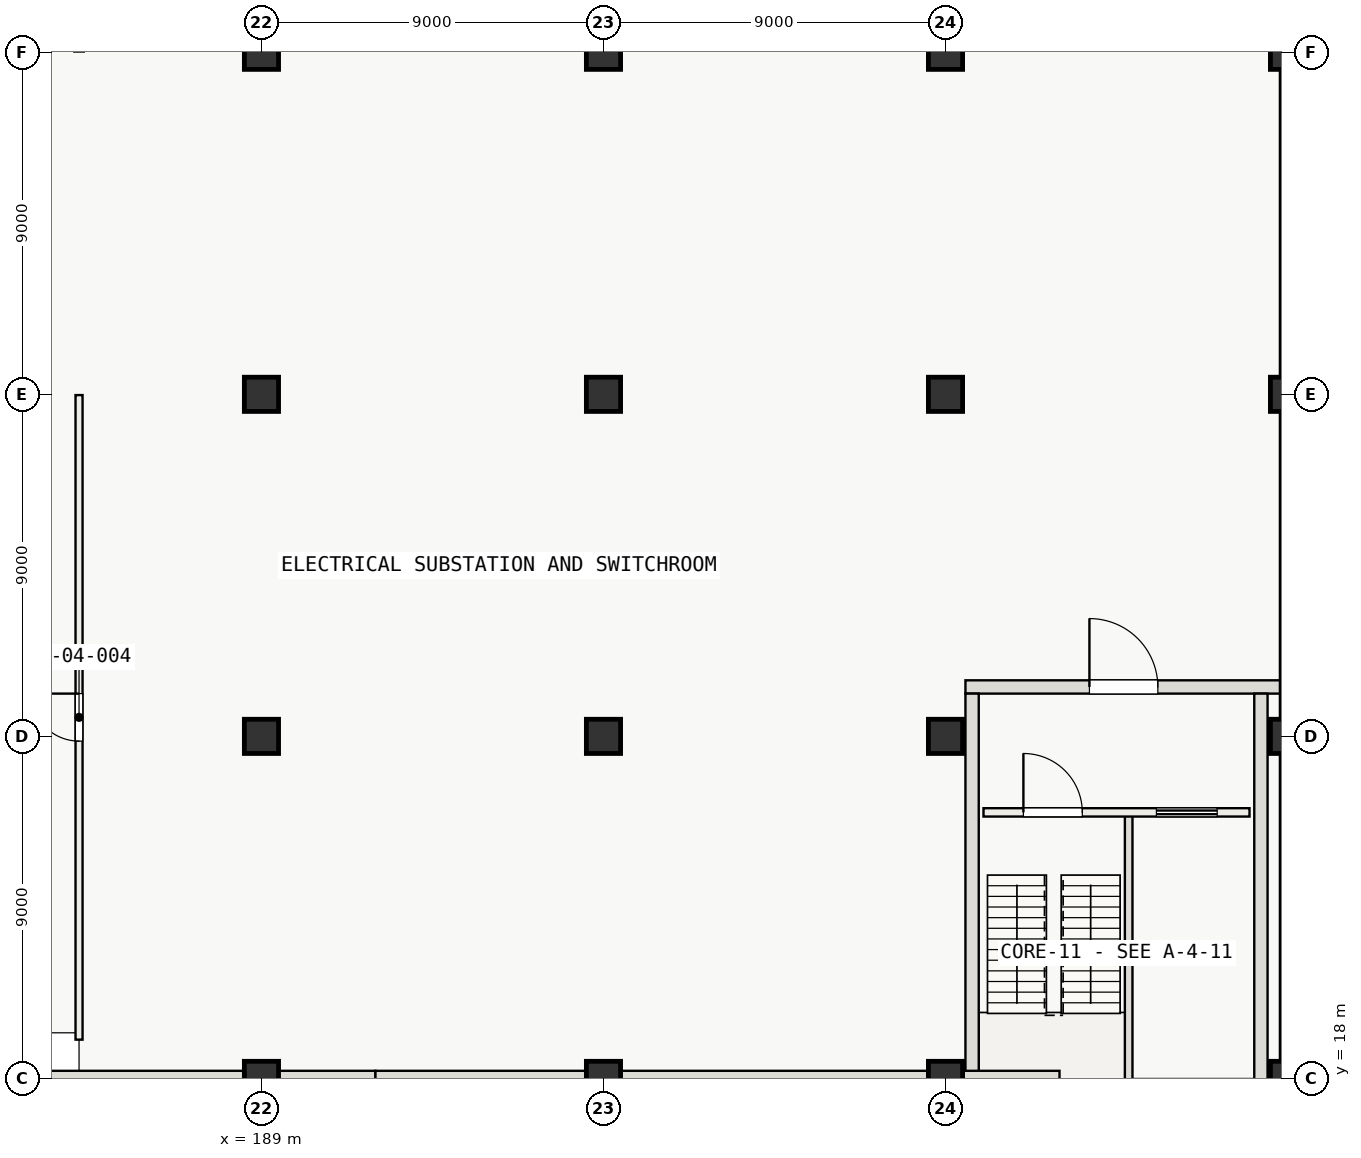
"""IFC4 building model, lengths in metres.
Left out: names, types, materials, properties, quantities, classifications, styles, units other than length and angle.
Written with IfcOpenShell. Run it as: python <this file> out.ifc"""

import sys

from ifc_helpers import new_model, si_unit, direction, frame, frame_2d, origin, origin_2d, place, context, subcontext, project, spatial, rectangle, extrude, element, fill, save


model = new_model("IFC4")
c1 = context("Model", 3, precision=1e-05, world=origin(), true_north=direction((0.0, 1.0)))
c2 = subcontext(c1, "Body", "Model", "MODEL_VIEW")
j1 = project(units=[si_unit("LENGTHUNIT", "METRE"), si_unit("PLANEANGLEUNIT", "RADIAN")], contexts=[c1])
p1 = place(None, origin())
s1 = spatial("IfcSite", under=j1, at=p1, CompositionType="ELEMENT")
p2 = place(p1, origin())
s2 = spatial("IfcBuilding", under=s1, at=p2, CompositionType="ELEMENT")
p3 = place(p2, frame((0.0, 0.0, -4.8)))
s3 = spatial("IfcBuildingStorey", under=s2, at=p3, CompositionType="ELEMENT", Elevation=-4.8)
p4 = place(p3, frame((207.525, 28.3, -0.45), z_axis=(0.0, 0.0, 1.0), x_axis=(1.0, 0.0, 0.0)))
e1 = element("IfcWall", 1, at=p4, inside=s3, PredefinedType="SHEAR", context=c2, shape_type="SweptSolid", body=[
    extrude(rectangle(XDim=8.325, YDim=0.35, at=frame_2d((4.163, 0.0))), origin(), (0.0, 0.0, 1.0), 5.25),
])
p5 = place(p4, frame((3.262, 0.0, 0.45)))
e2 = element("IfcOpeningElement", 2, at=p5, cuts=e1, PredefinedType="OPENING", context=c2, shape_type="SweptSolid", body=[
    extrude(rectangle(XDim=1.8, YDim=2.3, at=frame_2d((0.9, 1.15))), frame((0.0, 0.185, 0.0), z_axis=(0.0, -1.0, 0.0), x_axis=(1.0, 0.0, 0.0)), (0.0, 0.0, 1.0), 0.37),
])
for number, where, z_axis, x_axis in (
    (3, (207.7, 16.875, -0.45), (0.0, 0.0, 1.0), (0.0, 1.0, 0.0)),
    (4, (215.3, 16.875, -0.45), (0.0, 0.0, 1.0), (0.0, 1.0, 0.0)),
):
    element("IfcWall", number, at=place(p3, frame(where, z_axis=z_axis, x_axis=x_axis)), inside=s3, PredefinedType="SHEAR", context=c2, shape_type="SweptSolid", body=[
        extrude(rectangle(XDim=11.25, YDim=0.35, at=frame_2d((5.625, 0.0))), origin(), (0.0, 0.0, 1.0), 5.25),
    ])
for number, where, z_axis, x_axis in (
    (5, (174.0, 18.0, -0.45), (0.0, 0.0, 1.0), (1.0, 0.0, 0.0)),
    (6, (192.0, 18.0, -0.45), (0.0, 0.0, 1.0), (1.0, 0.0, 0.0)),
    (7, (216.0, 18.0, -0.45), (0.0, 0.0, 1.0), (0.0, 1.0, 0.0)),
    (8, (216.0, 36.0, -0.45), (0.0, 0.0, 1.0), (0.0, 1.0, 0.0)),
):
    element("IfcWall", number, at=place(p3, frame(where, z_axis=z_axis, x_axis=x_axis)), inside=s3, PredefinedType="USERDEFINED", context=c2, shape_type="SweptSolid", body=[
        extrude(rectangle(XDim=18.0, YDim=0.4, at=frame_2d((9.0, 0.0))), origin(), (0.0, 0.0, 1.0), 5.25),
    ])
for number, where, z_axis, x_axis in (
    (9, (189.0, 18.0, -0.45), (0.0, 0.0, 1.0), (1.0, 0.0, 0.0)),
    (10, (189.0, 27.0, -0.45), (0.0, 0.0, 1.0), (1.0, 0.0, 0.0)),
    (11, (189.0, 36.0, -0.45), (0.0, 0.0, 1.0), (1.0, 0.0, 0.0)),
    (12, (189.0, 45.0, -0.45), (0.0, 0.0, 1.0), (1.0, 0.0, 0.0)),
    (13, (198.0, 18.0, -0.45), (0.0, 0.0, 1.0), (1.0, 0.0, 0.0)),
    (14, (198.0, 27.0, -0.45), (0.0, 0.0, 1.0), (1.0, 0.0, 0.0)),
    (15, (198.0, 36.0, -0.45), (0.0, 0.0, 1.0), (1.0, 0.0, 0.0)),
    (16, (198.0, 45.0, -0.45), (0.0, 0.0, 1.0), (1.0, 0.0, 0.0)),
    (17, (207.0, 18.0, -0.45), (0.0, 0.0, 1.0), (1.0, 0.0, 0.0)),
    (18, (207.0, 27.0, -0.45), (0.0, 0.0, 1.0), (1.0, 0.0, 0.0)),
    (19, (207.0, 36.0, -0.45), (0.0, 0.0, 1.0), (1.0, 0.0, 0.0)),
    (20, (207.0, 45.0, -0.45), (0.0, 0.0, 1.0), (1.0, 0.0, 0.0)),
    (21, (216.0, 18.0, -0.45), (0.0, 0.0, 1.0), (1.0, 0.0, 0.0)),
    (22, (216.0, 27.0, -0.45), (0.0, 0.0, 1.0), (1.0, 0.0, 0.0)),
    (23, (216.0, 36.0, -0.45), (0.0, 0.0, 1.0), (1.0, 0.0, 0.0)),
    (24, (216.0, 45.0, -0.45), (0.0, 0.0, 1.0), (1.0, 0.0, 0.0)),
):
    element("IfcColumn", number, at=place(p3, frame(where, z_axis=z_axis, x_axis=x_axis)), inside=s3, PredefinedType="COLUMN", context=c2, shape_type="SweptSolid", body=[
        extrude(rectangle(XDim=0.9, YDim=0.9, at=origin_2d()), origin(), (0.0, 0.0, 1.0), 5.25),
    ])
p6 = place(p3, frame((211.82, 16.95, -0.45), z_axis=(0.0, 0.0, 1.0), x_axis=(0.0, 1.0, 0.0)))
e25 = element("IfcWall", 25, at=p6, inside=s3, PredefinedType="SOLIDWALL", context=c2, shape_type="SweptSolid", body=[
    extrude(rectangle(XDim=8.0, YDim=0.2, at=frame_2d((4.0, 0.0))), origin(), (0.0, 0.0, 1.0), 5.25),
])
p7 = place(p3, frame((208.0, 25.0, 0.0), z_axis=(0.0, 0.0, 1.0), x_axis=(1.0, 0.0, 0.0)))
e26 = element("IfcWall", 26, at=p7, inside=s3, PredefinedType="SOLIDWALL", context=c2, shape_type="SweptSolid", body=[
    extrude(rectangle(XDim=7.0, YDim=0.22, at=frame_2d((3.5, 0.0))), origin(), (0.0, 0.0, 1.0), 4.4),
])
p8 = place(p7, frame((1.05, 0.0, 0.0)))
e27 = element("IfcOpeningElement", 27, at=p8, cuts=e26, PredefinedType="OPENING", context=c2, shape_type="SweptSolid", body=[
    extrude(rectangle(XDim=1.55, YDim=2.2, at=frame_2d((0.775, 1.1))), frame((0.0, 0.12, 0.0), z_axis=(0.0, -1.0, 0.0), x_axis=(1.0, 0.0, 0.0)), (0.0, 0.0, 1.0), 0.24),
])
p9 = place(p7, frame((4.55, 0.0, 0.0)))
e28 = element("IfcOpeningElement", 28, at=p9, cuts=e26, PredefinedType="OPENING", context=c2, shape_type="SweptSolid", body=[
    extrude(rectangle(XDim=1.6, YDim=2.3, at=frame_2d((0.8, 1.15))), frame((0.0, 0.12, 0.0), z_axis=(0.0, -1.0, 0.0), x_axis=(1.0, 0.0, 0.0)), (0.0, 0.0, 1.0), 0.24),
])
p10 = place(p3, frame((184.2, 19.02, 0.0), z_axis=(0.0, 0.0, 1.0), x_axis=(0.0, 1.0, 0.0)))
e29 = element("IfcWall", 29, at=p10, inside=s3, PredefinedType="PARTITIONING", context=c2, shape_type="SweptSolid", body=[
    extrude(rectangle(XDim=16.96, YDim=0.185, at=frame_2d((8.48, 0.0))), origin(), (0.0, 0.0, 1.0), 3.42),
])
p11 = place(p10, frame((7.855, 0.0, 0.0)))
e30 = element("IfcOpeningElement", 30, at=p11, cuts=e29, PredefinedType="OPENING", context=c2, shape_type="SweptSolid", body=[
    extrude(rectangle(XDim=1.25, YDim=2.25, at=frame_2d((0.625, 1.125))), frame((0.0, 0.103, 0.0), z_axis=(0.0, -1.0, 0.0), x_axis=(1.0, 0.0, 0.0)), (0.0, 0.0, 1.0), 0.205),
])
p12 = place(p8, origin())
e31 = element("IfcDoor", 31, at=p12, inside=s3, OperationType="SINGLE_SWING_LEFT", PredefinedType="DOOR", context=c2, shape_type="SweptSolid", body=[
    extrude(rectangle(XDim=1.55, YDim=2.2, at=frame_2d((0.775, 1.1))), frame((0.0, 0.025, 0.0), z_axis=(0.0, -1.0, 0.0), x_axis=(1.0, 0.0, 0.0)), (0.0, 0.0, 1.0), 0.05),
])
fill(e27, e31)
p13 = place(p9, origin())
e32 = element("IfcDoor", 32, at=p13, inside=s3, OperationType="SLIDING_TO_LEFT", PredefinedType="DOOR", context=c2, shape_type="SweptSolid", body=[
    extrude(rectangle(XDim=1.6, YDim=2.3, at=frame_2d((0.8, 1.15))), frame((0.0, 0.025, 0.0), z_axis=(0.0, -1.0, 0.0), x_axis=(1.0, 0.0, 0.0)), (0.0, 0.0, 1.0), 0.05),
])
fill(e28, e32)
p14 = place(p5, origin())
e33 = element("IfcDoor", 33, at=p14, inside=s3, OperationType="DOUBLE_DOOR_SINGLE_SWING", PredefinedType="DOOR", context=c2, shape_type="SweptSolid", body=[
    extrude(rectangle(XDim=1.8, YDim=2.3, at=frame_2d((0.9, 1.15))), frame((0.0, 0.025, 0.0), z_axis=(0.0, -1.0, 0.0), x_axis=(1.0, 0.0, 0.0)), (0.0, 0.0, 1.0), 0.05),
])
fill(e2, e33)
p15 = place(p11, origin())
e34 = element("IfcDoor", 34, at=p15, inside=s3, OperationType="SINGLE_SWING_RIGHT", PredefinedType="DOOR", context=c2, shape_type="SweptSolid", body=[
    extrude(rectangle(XDim=1.25, YDim=2.25, at=frame_2d((0.625, 1.125))), frame((0.0, 0.025, 0.0), z_axis=(0.0, -1.0, 0.0), x_axis=(1.0, 0.0, 0.0)), (0.0, 0.0, 1.0), 0.05),
])
fill(e30, e34)
save(model, sys.argv[1])
